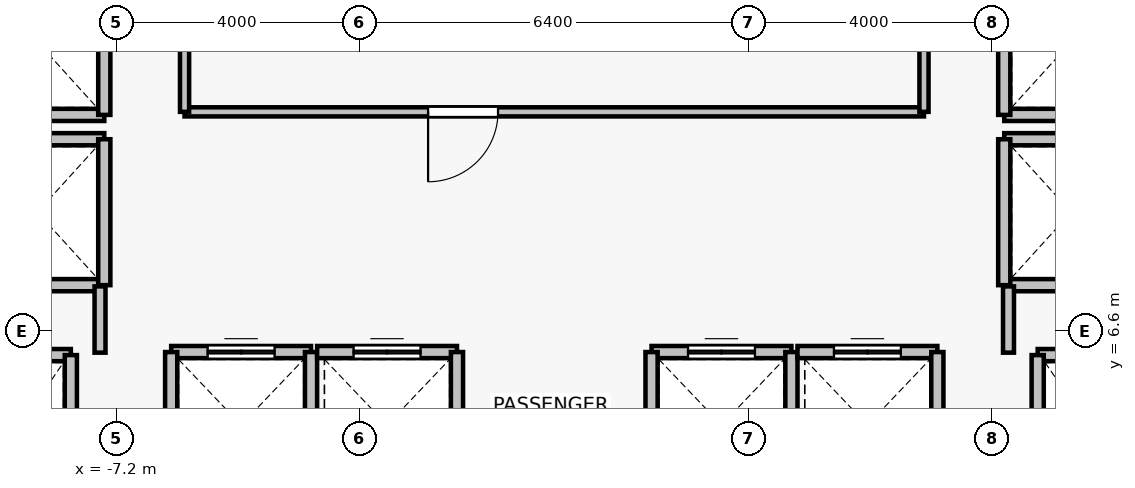
"""IFC4 building model, lengths in metres.
Left out: names, types, materials, properties, quantities, classifications, styles, units other than length and angle.
Written with IfcOpenShell. Run it as: python <this file> out.ifc"""

import sys

from ifc_helpers import new_model, si_unit, direction, frame, frame_2d, origin, place, context, subcontext, project, spatial, rectangle, extrude, source, transform, mapped, element, fill, save


model = new_model("IFC4")
c1 = context("Model", 3, precision=1e-05, world=origin(), true_north=direction((0.0, 1.0)))
c2 = subcontext(c1, "Body", "Model", "MODEL_VIEW")
j1 = project(units=[si_unit("LENGTHUNIT", "METRE"), si_unit("PLANEANGLEUNIT", "RADIAN")], contexts=[c1])
p1 = place(None, origin())
s1 = spatial("IfcSite", under=j1, at=p1, CompositionType="ELEMENT")
p2 = place(p1, origin())
s2 = spatial("IfcBuilding", under=s1, at=p2, CompositionType="ELEMENT")
p3 = place(p2, frame((0.0, 0.0, 103.3)))
s3 = spatial("IfcBuildingStorey", under=s2, at=p3, CompositionType="ELEMENT", Elevation=103.3)
p4 = place(p3, frame((-9.95, 6.2, 0.0), z_axis=(0.0, 0.0, 1.0), x_axis=(1.0, 0.0, 0.0)))
e1 = element("IfcWall", 1, at=p4, inside=s3, PredefinedType="SOLIDWALL", context=c2, shape_type="SweptSolid", body=[
    extrude(rectangle(XDim=2.0, YDim=0.2, at=frame_2d((1.0, 0.0))), origin(), (0.0, 0.0, 1.0), 3.075),
])
p5 = place(p3, frame((-7.95, 6.2, 0.0), z_axis=(0.0, 0.0, 1.0), x_axis=(0.0, -1.0, 0.0)))
e2 = element("IfcWall", 2, at=p5, inside=s3, PredefinedType="SOLIDWALL", context=c2, shape_type="SweptSolid", body=[
    extrude(rectangle(XDim=2.8, YDim=0.2, at=frame_2d((1.4, 0.0))), origin(), (0.0, 0.0, 1.0), 3.075),
])
p6 = place(p3, frame((7.95, 6.2, 0.0), z_axis=(0.0, 0.0, 1.0), x_axis=(1.0, 0.0, 0.0)))
e3 = element("IfcWall", 3, at=p6, inside=s3, PredefinedType="SOLIDWALL", context=c2, shape_type="SweptSolid", body=[
    extrude(rectangle(XDim=2.0, YDim=0.2, at=frame_2d((1.0, 0.0))), origin(), (0.0, 0.0, 1.0), 3.075),
])
p7 = place(p3, frame((7.95, 3.4, 0.0), z_axis=(0.0, 0.0, 1.0), x_axis=(0.0, 1.0, 0.0)))
e4 = element("IfcWall", 4, at=p7, inside=s3, PredefinedType="SOLIDWALL", context=c2, shape_type="SweptSolid", body=[
    extrude(rectangle(XDim=2.8, YDim=0.2, at=frame_2d((1.4, 0.0))), origin(), (0.0, 0.0, 1.0), 3.075),
])
p8 = place(p3, frame((-6.3, 6.25, 0.0), z_axis=(0.0, 0.0, 1.0), x_axis=(1.0, 0.0, 0.0)))
e5 = element("IfcWall", 5, at=p8, inside=s3, PredefinedType="SOLIDWALL", context=c2, shape_type="SweptSolid", body=[
    extrude(rectangle(XDim=2.3, YDim=0.2, at=frame_2d((1.15, 0.0))), origin(), (0.0, 0.0, 1.0), 3.075),
])
p9 = place(p8, frame((0.6, 0.0, 0.0)))
e6 = element("IfcOpeningElement", 6, at=p9, cuts=e5, PredefinedType="OPENING", context=c2, shape_type="SweptSolid", body=[
    extrude(rectangle(XDim=1.1, YDim=2.2, at=frame_2d((0.55, 1.1))), frame((0.0, 0.11, 0.0), z_axis=(0.0, -1.0, 0.0), x_axis=(1.0, 0.0, 0.0)), (0.0, 0.0, 1.0), 0.22),
])
for number, where, z_axis, x_axis in (
    (7, (-6.3, 3.85, 0.0), (0.0, 0.0, 1.0), (0.0, 1.0, 0.0)),
    (8, (-4.0, 6.25, 0.0), (0.0, 0.0, 1.0), (0.0, -1.0, 0.0)),
):
    element("IfcWall", number, at=place(p3, frame(where, z_axis=z_axis, x_axis=x_axis)), inside=s3, PredefinedType="SOLIDWALL", context=c2, shape_type="SweptSolid", body=[
        extrude(rectangle(XDim=2.4, YDim=0.2, at=frame_2d((1.2, 0.0))), origin(), (0.0, 0.0, 1.0), 3.075),
    ])
p10 = place(p3, frame((-3.9, 6.25, 0.0), z_axis=(0.0, 0.0, 1.0), x_axis=(1.0, 0.0, 0.0)))
e9 = element("IfcWall", 9, at=p10, inside=s3, PredefinedType="SOLIDWALL", context=c2, shape_type="SweptSolid", body=[
    extrude(rectangle(XDim=2.3, YDim=0.2, at=frame_2d((1.15, 0.0))), origin(), (0.0, 0.0, 1.0), 3.075),
])
p11 = place(p10, frame((0.6, 0.0, 0.0)))
e10 = element("IfcOpeningElement", 10, at=p11, cuts=e9, PredefinedType="OPENING", context=c2, shape_type="SweptSolid", body=[
    extrude(rectangle(XDim=1.1, YDim=2.2, at=frame_2d((0.55, 1.1))), frame((0.0, 0.11, 0.0), z_axis=(0.0, -1.0, 0.0), x_axis=(1.0, 0.0, 0.0)), (0.0, 0.0, 1.0), 0.22),
])
p12 = place(p3, frame((-1.6, 6.25, 0.0), z_axis=(0.0, 0.0, 1.0), x_axis=(0.0, -1.0, 0.0)))
e11 = element("IfcWall", 11, at=p12, inside=s3, PredefinedType="SOLIDWALL", context=c2, shape_type="SweptSolid", body=[
    extrude(rectangle(XDim=2.4, YDim=0.2, at=frame_2d((1.2, 0.0))), origin(), (0.0, 0.0, 1.0), 3.075),
])
p13 = place(p3, frame((1.6, 6.25, 0.0), z_axis=(0.0, 0.0, 1.0), x_axis=(1.0, 0.0, 0.0)))
e12 = element("IfcWall", 12, at=p13, inside=s3, PredefinedType="SOLIDWALL", context=c2, shape_type="SweptSolid", body=[
    extrude(rectangle(XDim=2.3, YDim=0.2, at=frame_2d((1.15, 0.0))), origin(), (0.0, 0.0, 1.0), 3.075),
])
p14 = place(p13, frame((0.6, 0.0, 0.0)))
e13 = element("IfcOpeningElement", 13, at=p14, cuts=e12, PredefinedType="OPENING", context=c2, shape_type="SweptSolid", body=[
    extrude(rectangle(XDim=1.1, YDim=2.2, at=frame_2d((0.55, 1.1))), frame((0.0, 0.11, 0.0), z_axis=(0.0, -1.0, 0.0), x_axis=(1.0, 0.0, 0.0)), (0.0, 0.0, 1.0), 0.22),
])
for number, where, z_axis, x_axis in (
    (14, (1.6, 3.85, 0.0), (0.0, 0.0, 1.0), (0.0, 1.0, 0.0)),
    (15, (3.9, 6.25, 0.0), (0.0, 0.0, 1.0), (0.0, -1.0, 0.0)),
):
    element("IfcWall", number, at=place(p3, frame(where, z_axis=z_axis, x_axis=x_axis)), inside=s3, PredefinedType="SOLIDWALL", context=c2, shape_type="SweptSolid", body=[
        extrude(rectangle(XDim=2.4, YDim=0.2, at=frame_2d((1.2, 0.0))), origin(), (0.0, 0.0, 1.0), 3.075),
    ])
p15 = place(p3, frame((4.0, 6.25, 0.0), z_axis=(0.0, 0.0, 1.0), x_axis=(1.0, 0.0, 0.0)))
e16 = element("IfcWall", 16, at=p15, inside=s3, PredefinedType="SOLIDWALL", context=c2, shape_type="SweptSolid", body=[
    extrude(rectangle(XDim=2.3, YDim=0.2, at=frame_2d((1.15, 0.0))), origin(), (0.0, 0.0, 1.0), 3.075),
])
p16 = place(p15, frame((0.6, 0.0, 0.0)))
e17 = element("IfcOpeningElement", 17, at=p16, cuts=e16, PredefinedType="OPENING", context=c2, shape_type="SweptSolid", body=[
    extrude(rectangle(XDim=1.1, YDim=2.2, at=frame_2d((0.55, 1.1))), frame((0.0, 0.11, 0.0), z_axis=(0.0, -1.0, 0.0), x_axis=(1.0, 0.0, 0.0)), (0.0, 0.0, 1.0), 0.22),
])
p17 = place(p3, frame((6.3, 6.25, 0.0), z_axis=(0.0, 0.0, 1.0), x_axis=(0.0, -1.0, 0.0)))
e18 = element("IfcWall", 18, at=p17, inside=s3, PredefinedType="SOLIDWALL", context=c2, shape_type="SweptSolid", body=[
    extrude(rectangle(XDim=2.4, YDim=0.2, at=frame_2d((1.2, 0.0))), origin(), (0.0, 0.0, 1.0), 3.075),
])
for number, where, z_axis, x_axis in (
    (19, (-7.4, 7.35, 0.0), (0.0, 0.0, 1.0), (-1.0, 0.0, 0.0)),
    (20, (-9.6, 9.75, 0.0), (0.0, 0.0, 1.0), (1.0, 0.0, 0.0)),
):
    element("IfcWall", number, at=place(p3, frame(where, z_axis=z_axis, x_axis=x_axis)), inside=s3, PredefinedType="SOLIDWALL", context=c2, shape_type="SweptSolid", body=[
        extrude(rectangle(XDim=2.2, YDim=0.2, at=frame_2d((1.1, 0.0))), origin(), (0.0, 0.0, 1.0), 2.515),
    ])
p18 = place(p3, frame((-7.4, 9.75, 0.0), z_axis=(0.0, 0.0, 1.0), x_axis=(0.0, -1.0, 0.0)))
e21 = element("IfcWall", 21, at=p18, inside=s3, PredefinedType="SOLIDWALL", context=c2, shape_type="SweptSolid", body=[
    extrude(rectangle(XDim=2.4, YDim=0.2, at=frame_2d((1.2, 0.0))), origin(), (0.0, 0.0, 1.0), 2.515),
])
p19 = place(p3, frame((-7.4, 10.15, 0.0), z_axis=(0.0, 0.0, 1.0), x_axis=(-1.0, 0.0, 0.0)))
e22 = element("IfcWall", 22, at=p19, inside=s3, PredefinedType="SOLIDWALL", context=c2, shape_type="SweptSolid", body=[
    extrude(rectangle(XDim=2.2, YDim=0.2, at=frame_2d((1.1, 0.0))), origin(), (0.0, 0.0, 1.0), 2.515),
])
p20 = place(p3, frame((-7.4, 12.55, 0.0), z_axis=(0.0, 0.0, 1.0), x_axis=(0.0, -1.0, 0.0)))
e23 = element("IfcWall", 23, at=p20, inside=s3, PredefinedType="SOLIDWALL", context=c2, shape_type="SweptSolid", body=[
    extrude(rectangle(XDim=2.4, YDim=0.2, at=frame_2d((1.2, 0.0))), origin(), (0.0, 0.0, 1.0), 2.515),
])
for number, where, z_axis, x_axis in (
    (24, (9.6, 7.35, 0.0), (0.0, 0.0, 1.0), (-1.0, 0.0, 0.0)),
    (25, (7.4, 9.75, 0.0), (0.0, 0.0, 1.0), (1.0, 0.0, 0.0)),
):
    element("IfcWall", number, at=place(p3, frame(where, z_axis=z_axis, x_axis=x_axis)), inside=s3, PredefinedType="SOLIDWALL", context=c2, shape_type="SweptSolid", body=[
        extrude(rectangle(XDim=2.2, YDim=0.2, at=frame_2d((1.1, 0.0))), origin(), (0.0, 0.0, 1.0), 2.515),
    ])
p21 = place(p3, frame((7.4, 7.35, 0.0), z_axis=(0.0, 0.0, 1.0), x_axis=(0.0, 1.0, 0.0)))
e26 = element("IfcWall", 26, at=p21, inside=s3, PredefinedType="SOLIDWALL", context=c2, shape_type="SweptSolid", body=[
    extrude(rectangle(XDim=2.4, YDim=0.2, at=frame_2d((1.2, 0.0))), origin(), (0.0, 0.0, 1.0), 2.515),
])
p22 = place(p3, frame((9.6, 10.15, 0.0), z_axis=(0.0, 0.0, 1.0), x_axis=(-1.0, 0.0, 0.0)))
e27 = element("IfcWall", 27, at=p22, inside=s3, PredefinedType="SOLIDWALL", context=c2, shape_type="SweptSolid", body=[
    extrude(rectangle(XDim=2.2, YDim=0.2, at=frame_2d((1.1, 0.0))), origin(), (0.0, 0.0, 1.0), 2.515),
])
p23 = place(p3, frame((7.4, 10.15, 0.0), z_axis=(0.0, 0.0, 1.0), x_axis=(0.0, 1.0, 0.0)))
e28 = element("IfcWall", 28, at=p23, inside=s3, PredefinedType="SOLIDWALL", context=c2, shape_type="SweptSolid", body=[
    extrude(rectangle(XDim=2.4, YDim=0.2, at=frame_2d((1.2, 0.0))), origin(), (0.0, 0.0, 1.0), 2.515),
])
for number, where, z_axis, x_axis in (
    (29, (-7.47, 7.33, 0.0), (0.0, 0.0, 1.0), (0.0, -1.0, 0.0)),
    (30, (7.47, 6.24, 0.0), (0.0, 0.0, 1.0), (0.0, 1.0, 0.0)),
):
    element("IfcWall", number, at=place(p3, frame(where, z_axis=z_axis, x_axis=x_axis)), inside=s3, PredefinedType="PARTITIONING", context=c2, shape_type="SweptSolid", body=[
        extrude(rectangle(XDim=1.09, YDim=0.18, at=frame_2d((0.545, 0.0))), origin(), (0.0, 0.0, 1.0), 2.515),
    ])
p24 = place(p3, frame((6.08, 10.2, 0.0), z_axis=(0.0, 0.0, 1.0), x_axis=(-1.0, 0.0, 0.0)))
e31 = element("IfcWall", 31, at=p24, inside=s3, PredefinedType="PARTITIONING", context=c2, shape_type="SweptSolid", body=[
    extrude(rectangle(XDim=12.16, YDim=0.15, at=frame_2d((6.08, 0.0))), origin(), (0.0, 0.0, 1.0), 3.075),
])
p25 = place(p24, frame((7.005, 0.0, 0.0)))
e32 = element("IfcOpeningElement", 32, at=p25, cuts=e31, PredefinedType="OPENING", context=c2, shape_type="SweptSolid", body=[
    extrude(rectangle(XDim=1.15, YDim=2.15, at=frame_2d((0.575, 1.075))), frame((0.0, 0.085, 0.0), z_axis=(0.0, -1.0, 0.0), x_axis=(1.0, 0.0, 0.0)), (0.0, 0.0, 1.0), 0.17),
])
for number, where, z_axis, x_axis in (
    (33, (-6.08, 10.2, 0.0), (0.0, 0.0, 1.0), (0.0, 1.0, 0.0)),
    (34, (6.08, 13.0, 0.0), (0.0, 0.0, 1.0), (0.0, -1.0, 0.0)),
):
    element("IfcWall", number, at=place(p3, frame(where, z_axis=z_axis, x_axis=x_axis)), inside=s3, PredefinedType="PARTITIONING", context=c2, shape_type="SweptSolid", body=[
        extrude(rectangle(XDim=2.8, YDim=0.15, at=frame_2d((1.4, 0.0))), origin(), (0.0, 0.0, 1.0), 3.075),
    ])
m1 = source(origin(), c2, "Body", "SweptSolid", [
    extrude(rectangle(XDim=1.1, YDim=2.2, at=frame_2d((0.55, 1.1))), frame((0.0, 0.025, 0.0), z_axis=(0.0, -1.0, 0.0), x_axis=(1.0, 0.0, 0.0)), (0.0, 0.0, 1.0), 0.05),
])
p26 = place(p9, origin())
e35 = element("IfcDoor", 35, at=p26, inside=s3, OperationType="DOUBLE_DOOR_SLIDING", PredefinedType="DOOR", context=c2, shape_type="MappedRepresentation", body=[
    mapped(m1, transform((0.0, 0.0, 0.0), x_axis=(1.0, 0.0, 0.0), y_axis=(0.0, 1.0, 0.0), z_axis=(0.0, 0.0, 1.0), scale=1.0)),
])
fill(e6, e35)
p27 = place(p11, origin())
e36 = element("IfcDoor", 36, at=p27, inside=s3, OperationType="DOUBLE_DOOR_SLIDING", PredefinedType="DOOR", context=c2, shape_type="MappedRepresentation", body=[
    mapped(m1, transform((0.0, 0.0, 0.0), x_axis=(1.0, 0.0, 0.0), y_axis=(0.0, 1.0, 0.0), z_axis=(0.0, 0.0, 1.0), scale=1.0)),
])
fill(e10, e36)
p28 = place(p14, origin())
e37 = element("IfcDoor", 37, at=p28, inside=s3, OperationType="DOUBLE_DOOR_SLIDING", PredefinedType="DOOR", context=c2, shape_type="MappedRepresentation", body=[
    mapped(m1, transform((0.0, 0.0, 0.0), x_axis=(1.0, 0.0, 0.0), y_axis=(0.0, 1.0, 0.0), z_axis=(0.0, 0.0, 1.0), scale=1.0)),
])
fill(e13, e37)
p29 = place(p16, origin())
e38 = element("IfcDoor", 38, at=p29, inside=s3, OperationType="DOUBLE_DOOR_SLIDING", PredefinedType="DOOR", context=c2, shape_type="MappedRepresentation", body=[
    mapped(m1, transform((0.0, 0.0, 0.0), x_axis=(1.0, 0.0, 0.0), y_axis=(0.0, 1.0, 0.0), z_axis=(0.0, 0.0, 1.0), scale=1.0)),
])
fill(e17, e38)
m2 = source(origin(), c2, "Body", "SweptSolid", [
    extrude(rectangle(XDim=1.15, YDim=2.15, at=frame_2d((0.575, 1.075))), frame((0.0, 0.025, 0.0), z_axis=(0.0, -1.0, 0.0), x_axis=(1.0, 0.0, 0.0)), (0.0, 0.0, 1.0), 0.05),
])
p30 = place(p25, origin())
e39 = element("IfcDoor", 39, at=p30, inside=s3, OperationType="SINGLE_SWING_RIGHT", PredefinedType="DOOR", context=c2, shape_type="MappedRepresentation", body=[
    mapped(m2, transform((0.0, 0.0, 0.0), x_axis=(1.0, 0.0, 0.0), y_axis=(0.0, 1.0, 0.0), z_axis=(0.0, 0.0, 1.0), scale=1.0)),
])
fill(e32, e39)
save(model, sys.argv[1])
